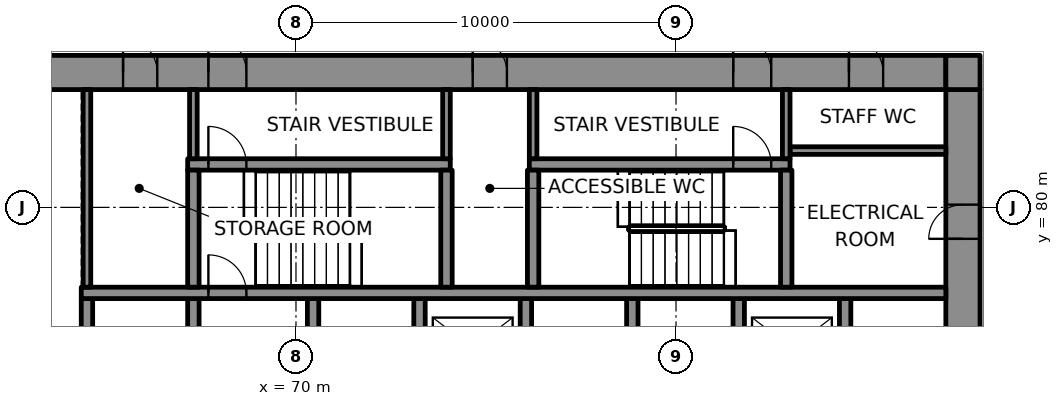
"""IFC4 building model, lengths in metres.
Left out: names, types, materials, properties, quantities, classifications, styles, units other than length and angle.
Written with IfcOpenShell. Run it as: python <this file> out.ifc"""

import sys

from ifc_helpers import new_model, si_unit, direction, frame, frame_2d, origin, place, context, subcontext, project, spatial, rectangle, extrude, element, fill, save


model = new_model("IFC4")
c1 = context("Model", 3, precision=1e-05, world=origin(), true_north=direction((0.0, 1.0)))
c2 = subcontext(c1, "Body", "Model", "MODEL_VIEW")
j1 = project(units=[si_unit("LENGTHUNIT", "METRE"), si_unit("PLANEANGLEUNIT", "RADIAN")], contexts=[c1])
p1 = place(None, origin())
s1 = spatial("IfcSite", under=j1, at=p1, CompositionType="ELEMENT")
p2 = place(p1, origin())
s2 = spatial("IfcBuilding", under=s1, at=p2, CompositionType="ELEMENT")
p3 = place(p2, frame((0.0, 0.0, 140.8)))
s3 = spatial("IfcBuildingStorey", under=s2, at=p3, CompositionType="ELEMENT", Elevation=140.8)
p4 = place(p3, frame((62.0, 83.55, 0.0), z_axis=(0.0, 0.0, 1.0), x_axis=(1.0, 0.0, 0.0)))
e1 = element("IfcWall", 1, at=p4, inside=s3, PredefinedType="SHEAR", context=c2, shape_type="SweptSolid", body=[
    extrude(rectangle(XDim=25.1, YDim=0.9, at=frame_2d((12.55, 0.0))), origin(), (0.0, 0.0, 1.0), 5.55),
])
p5 = place(p4, frame((5.695, 0.0, 0.0)))
e2 = element("IfcOpeningElement", 2, at=p5, cuts=e1, PredefinedType="OPENING", context=c2, shape_type="SweptSolid", body=[
    extrude(rectangle(XDim=1.0, YDim=2.1, at=frame_2d((0.5, 1.05))), frame((0.0, 0.46, 0.0), z_axis=(0.0, -1.0, 0.0), x_axis=(1.0, 0.0, 0.0)), (0.0, 0.0, 1.0), 0.92),
])
p6 = place(p4, frame((19.505, 0.0, 0.0)))
e3 = element("IfcOpeningElement", 3, at=p6, cuts=e1, PredefinedType="OPENING", context=c2, shape_type="SweptSolid", body=[
    extrude(rectangle(XDim=1.0, YDim=2.1, at=frame_2d((0.5, 1.05))), frame((0.0, 0.46, 0.0), z_axis=(0.0, -1.0, 0.0), x_axis=(1.0, 0.0, 0.0)), (0.0, 0.0, 1.0), 0.92),
])
p7 = place(p4, frame((3.45, 0.0, 0.0)))
e4 = element("IfcOpeningElement", 4, at=p7, cuts=e1, PredefinedType="OPENING", context=c2, shape_type="SweptSolid", body=[
    extrude(rectangle(XDim=0.9, YDim=2.1, at=frame_2d((0.45, 1.05))), frame((0.0, 0.46, 0.0), z_axis=(0.0, -1.0, 0.0), x_axis=(1.0, 0.0, 0.0)), (0.0, 0.0, 1.0), 0.92),
])
p8 = place(p4, frame((12.65, 0.0, 0.0)))
e5 = element("IfcOpeningElement", 5, at=p8, cuts=e1, PredefinedType="OPENING", context=c2, shape_type="SweptSolid", body=[
    extrude(rectangle(XDim=0.9, YDim=2.1, at=frame_2d((0.45, 1.05))), frame((0.0, 0.46, 0.0), z_axis=(0.0, -1.0, 0.0), x_axis=(1.0, 0.0, 0.0)), (0.0, 0.0, 1.0), 0.92),
])
p9 = place(p4, frame((22.55, 0.0, 0.0)))
e6 = element("IfcOpeningElement", 6, at=p9, cuts=e1, PredefinedType="OPENING", context=c2, shape_type="SweptSolid", body=[
    extrude(rectangle(XDim=0.9, YDim=2.1, at=frame_2d((0.45, 1.05))), frame((0.0, 0.46, 0.0), z_axis=(0.0, -1.0, 0.0), x_axis=(1.0, 0.0, 0.0)), (0.0, 0.0, 1.0), 0.92),
])
p10 = place(p3, frame((87.55, 66.9, 0.0), z_axis=(0.0, 0.0, 1.0), x_axis=(0.0, 1.0, 0.0)))
e7 = element("IfcWall", 7, at=p10, inside=s3, PredefinedType="SHEAR", context=c2, shape_type="SweptSolid", body=[
    extrude(rectangle(XDim=16.2, YDim=0.9, at=frame_2d((8.1, 0.0))), origin(), (0.0, 0.0, 1.0), 5.55),
])
p11 = place(p10, frame((5.5, 0.0, 0.0)))
e8 = element("IfcOpeningElement", 8, at=p11, cuts=e7, PredefinedType="OPENING", context=c2, shape_type="SweptSolid", body=[
    extrude(rectangle(XDim=1.8, YDim=2.1, at=frame_2d((0.9, 1.05))), frame((0.0, 0.46, 0.0), z_axis=(0.0, -1.0, 0.0), x_axis=(1.0, 0.0, 0.0)), (0.0, 0.0, 1.0), 0.92),
])
p12 = place(p10, frame((12.272, 0.0, 0.0)))
e9 = element("IfcOpeningElement", 9, at=p12, cuts=e7, PredefinedType="OPENING", context=c2, shape_type="SweptSolid", body=[
    extrude(rectangle(XDim=0.9, YDim=2.1, at=frame_2d((0.45, 1.05))), frame((0.0, 0.46, 0.0), z_axis=(0.0, -1.0, 0.0), x_axis=(1.0, 0.0, 0.0)), (0.0, 0.0, 1.0), 0.92),
])
for number, where, z_axis, x_axis in (
    (10, (64.5, 75.0, 0.0), (0.0, 0.0, 1.0), (0.0, 1.0, 0.0)),
    (11, (67.3, 75.0, 0.0), (0.0, 0.0, 1.0), (0.0, 1.0, 0.0)),
):
    element("IfcWall", number, at=place(p3, frame(where, z_axis=z_axis, x_axis=x_axis)), inside=s3, PredefinedType="SHEAR", context=c2, shape_type="SweptSolid", body=[
        extrude(rectangle(XDim=2.6, YDim=0.3, at=frame_2d((1.3, 0.0))), origin(), (0.0, 0.0, 1.0), 5.55),
    ])
p13 = place(p3, frame((70.45, 75.0, 0.0), z_axis=(0.0, 0.0, 1.0), x_axis=(0.0, 1.0, 0.0)))
e12 = element("IfcWall", 12, at=p13, inside=s3, PredefinedType="SHEAR", context=c2, shape_type="SweptSolid", body=[
    extrude(rectangle(XDim=2.6, YDim=0.3, at=frame_2d((1.3, 0.0))), origin(), (0.0, 0.0, 1.0), 5.55),
])
p14 = place(p13, frame((0.15, 0.0, 0.0)))
e13 = element("IfcOpeningElement", 13, at=p14, cuts=e12, PredefinedType="OPENING", context=c2, shape_type="SweptSolid", body=[
    extrude(rectangle(XDim=1.1, YDim=2.1, at=frame_2d((0.55, 1.05))), frame((0.0, 0.16, 0.0), z_axis=(0.0, -1.0, 0.0), x_axis=(1.0, 0.0, 0.0)), (0.0, 0.0, 1.0), 0.32),
])
for number, where, z_axis, x_axis in (
    (14, (73.25, 75.0, 0.0), (0.0, 0.0, 1.0), (0.0, 1.0, 0.0)),
    (15, (76.05, 75.0, 0.0), (0.0, 0.0, 1.0), (0.0, 1.0, 0.0)),
    (16, (78.85, 75.0, 0.0), (0.0, 0.0, 1.0), (0.0, 1.0, 0.0)),
    (17, (81.65, 75.0, 0.0), (0.0, 0.0, 1.0), (0.0, 1.0, 0.0)),
    (18, (84.45, 75.0, 0.0), (0.0, 0.0, 1.0), (0.0, 1.0, 0.0)),
):
    element("IfcWall", number, at=place(p3, frame(where, z_axis=z_axis, x_axis=x_axis)), inside=s3, PredefinedType="SHEAR", context=c2, shape_type="SweptSolid", body=[
        extrude(rectangle(XDim=2.6, YDim=0.3, at=frame_2d((1.3, 0.0))), origin(), (0.0, 0.0, 1.0), 5.55),
    ])
p15 = place(p3, frame((64.35, 77.75, 0.0), z_axis=(0.0, 0.0, 1.0), x_axis=(1.0, 0.0, 0.0)))
e19 = element("IfcWall", 19, at=p15, inside=s3, PredefinedType="SHEAR", context=c2, shape_type="SweptSolid", body=[
    extrude(rectangle(XDim=22.75, YDim=0.3, at=frame_2d((11.375, 0.0))), origin(), (0.0, 0.0, 1.0), 5.55),
])
p16 = place(p15, frame((3.345, 0.0, 0.0)))
e20 = element("IfcOpeningElement", 20, at=p16, cuts=e19, PredefinedType="OPENING", context=c2, shape_type="SweptSolid", body=[
    extrude(rectangle(XDim=1.0, YDim=2.1, at=frame_2d((0.5, 1.05))), frame((0.0, 0.16, 0.0), z_axis=(0.0, -1.0, 0.0), x_axis=(1.0, 0.0, 0.0)), (0.0, 0.0, 1.0), 0.32),
])
p17 = place(p3, frame((67.15, 81.13, 0.0), z_axis=(0.0, 0.0, 1.0), x_axis=(1.0, 0.0, 0.0)))
e21 = element("IfcWall", 21, at=p17, inside=s3, PredefinedType="SHEAR", context=c2, shape_type="SweptSolid", body=[
    extrude(rectangle(XDim=6.91, YDim=0.3, at=frame_2d((3.455, 0.0))), origin(), (0.0, 0.0, 1.0), 5.55),
])
p18 = place(p17, frame((0.545, 0.0, 0.0)))
e22 = element("IfcOpeningElement", 22, at=p18, cuts=e21, PredefinedType="OPENING", context=c2, shape_type="SweptSolid", body=[
    extrude(rectangle(XDim=1.0, YDim=2.1, at=frame_2d((0.5, 1.05))), frame((0.0, 0.16, 0.0), z_axis=(0.0, -1.0, 0.0), x_axis=(1.0, 0.0, 0.0)), (0.0, 0.0, 1.0), 0.32),
])
p19 = place(p3, frame((76.14, 81.13, 0.0), z_axis=(0.0, 0.0, 1.0), x_axis=(1.0, 0.0, 0.0)))
e23 = element("IfcWall", 23, at=p19, inside=s3, PredefinedType="SHEAR", context=c2, shape_type="SweptSolid", body=[
    extrude(rectangle(XDim=6.86, YDim=0.3, at=frame_2d((3.43, 0.0))), origin(), (0.0, 0.0, 1.0), 5.55),
])
p20 = place(p19, frame((5.365, 0.0, 0.0)))
e24 = element("IfcOpeningElement", 24, at=p20, cuts=e23, PredefinedType="OPENING", context=c2, shape_type="SweptSolid", body=[
    extrude(rectangle(XDim=1.0, YDim=2.1, at=frame_2d((0.5, 1.05))), frame((0.0, 0.16, 0.0), z_axis=(0.0, -1.0, 0.0), x_axis=(1.0, 0.0, 0.0)), (0.0, 0.0, 1.0), 0.32),
])
for number, where, z_axis, x_axis in (
    (25, (67.3, 77.9, 0.0), (0.0, 0.0, 1.0), (0.0, 1.0, 0.0)),
    (26, (73.96, 77.9, 0.0), (0.0, 0.0, 1.0), (0.0, 1.0, 0.0)),
    (27, (76.24, 77.9, 0.0), (0.0, 0.0, 1.0), (0.0, 1.0, 0.0)),
    (28, (82.9, 77.9, 0.0), (0.0, 0.0, 1.0), (0.0, 1.0, 0.0)),
):
    element("IfcWall", number, at=place(p3, frame(where, z_axis=z_axis, x_axis=x_axis)), inside=s3, PredefinedType="SHEAR", context=c2, shape_type="SweptSolid", body=[
        extrude(rectangle(XDim=3.08, YDim=0.3, at=frame_2d((1.54, 0.0))), origin(), (0.0, 0.0, 1.0), 5.55),
    ])
p21 = place(p3, frame((87.1, 83.55, 0.0), z_axis=(0.0, 0.0, 1.0), x_axis=(1.0, 0.0, 0.0)))
e29 = element("IfcWall", 29, at=p21, inside=s3, PredefinedType="SHEAR", context=c2, shape_type="SweptSolid", body=[
    extrude(rectangle(XDim=0.9, YDim=0.9, at=frame_2d((0.45, 0.0))), origin(), (0.0, 0.0, 1.0), 5.55),
])
p22 = place(p3, frame((83.0, 81.495, 0.0), z_axis=(0.0, 0.0, 1.0), x_axis=(1.0, 0.0, 0.0)))
e30 = element("IfcWall", 30, at=p22, inside=s3, PredefinedType="PARTITIONING", context=c2, shape_type="SweptSolid", body=[
    extrude(rectangle(XDim=4.1, YDim=0.2, at=frame_2d((2.05, 0.0))), origin(), (0.0, 0.0, 1.0), 5.55),
])
p23 = place(p3, frame((64.5, 77.9, 0.0), z_axis=(0.0, 0.0, 1.0), x_axis=(0.0, 1.0, 0.0)))
e31 = element("IfcWall", 31, at=p23, inside=s3, PredefinedType="PARTITIONING", context=c2, shape_type="SweptSolid", body=[
    extrude(rectangle(XDim=5.2, YDim=0.2, at=frame_2d((2.6, 0.0))), origin(), (0.0, 0.0, 1.0), 5.55),
])
for number, where, z_axis, x_axis in (
    (32, (67.3, 81.28, 0.0), (0.0, 0.0, 1.0), (0.0, 1.0, 0.0)),
    (33, (73.96, 81.28, 0.0), (0.0, 0.0, 1.0), (0.0, 1.0, 0.0)),
    (34, (76.24, 81.28, 0.0), (0.0, 0.0, 1.0), (0.0, 1.0, 0.0)),
    (35, (82.9, 81.28, 0.0), (0.0, 0.0, 1.0), (0.0, 1.0, 0.0)),
):
    element("IfcWall", number, at=place(p3, frame(where, z_axis=z_axis, x_axis=x_axis)), inside=s3, PredefinedType="PARTITIONING", context=c2, shape_type="SweptSolid", body=[
        extrude(rectangle(XDim=1.82, YDim=0.2, at=frame_2d((0.91, 0.0))), origin(), (0.0, 0.0, 1.0), 5.55),
    ])
p24 = place(p16, origin())
e36 = element("IfcDoor", 36, at=p24, inside=s3, OperationType="SINGLE_SWING_LEFT", PredefinedType="DOOR", context=c2, shape_type="SweptSolid", body=[
    extrude(rectangle(XDim=1.0, YDim=2.1, at=frame_2d((0.5, 1.05))), frame((0.0, 0.025, 0.0), z_axis=(0.0, -1.0, 0.0), x_axis=(1.0, 0.0, 0.0)), (0.0, 0.0, 1.0), 0.05),
])
fill(e20, e36)
p25 = place(p18, origin())
e37 = element("IfcDoor", 37, at=p25, inside=s3, OperationType="SINGLE_SWING_RIGHT", PredefinedType="DOOR", context=c2, shape_type="SweptSolid", body=[
    extrude(rectangle(XDim=1.0, YDim=2.1, at=frame_2d((0.5, 1.05))), frame((0.0, 0.025, 0.0), z_axis=(0.0, -1.0, 0.0), x_axis=(1.0, 0.0, 0.0)), (0.0, 0.0, 1.0), 0.05),
])
fill(e22, e37)
p26 = place(p5, origin())
e38 = element("IfcDoor", 38, at=p26, inside=s3, OperationType="SINGLE_SWING_LEFT", PredefinedType="DOOR", context=c2, shape_type="SweptSolid", body=[
    extrude(rectangle(XDim=1.0, YDim=2.1, at=frame_2d((0.5, 1.05))), frame((0.0, 0.17, 0.0), z_axis=(0.0, -1.0, 0.0), x_axis=(1.0, 0.0, 0.0)), (0.0, 0.0, 1.0), 0.34),
])
fill(e2, e38)
p27 = place(p20, origin())
e39 = element("IfcDoor", 39, at=p27, inside=s3, OperationType="SINGLE_SWING_RIGHT", PredefinedType="DOOR", context=c2, shape_type="SweptSolid", body=[
    extrude(rectangle(XDim=1.0, YDim=2.1, at=frame_2d((0.5, 1.05))), frame((0.0, 0.025, 0.0), z_axis=(0.0, -1.0, 0.0), x_axis=(1.0, 0.0, 0.0)), (0.0, 0.0, 1.0), 0.05),
])
fill(e24, e39)
p28 = place(p6, origin())
e40 = element("IfcDoor", 40, at=p28, inside=s3, OperationType="SINGLE_SWING_LEFT", PredefinedType="DOOR", context=c2, shape_type="SweptSolid", body=[
    extrude(rectangle(XDim=1.0, YDim=2.1, at=frame_2d((0.5, 1.05))), frame((0.0, 0.17, 0.0), z_axis=(0.0, -1.0, 0.0), x_axis=(1.0, 0.0, 0.0)), (0.0, 0.0, 1.0), 0.34),
])
fill(e3, e40)
p29 = place(p7, origin())
e41 = element("IfcDoor", 41, at=p29, inside=s3, OperationType="SINGLE_SWING_RIGHT", PredefinedType="DOOR", context=c2, shape_type="SweptSolid", body=[
    extrude(rectangle(XDim=0.9, YDim=2.1, at=frame_2d((0.45, 1.05))), frame((0.0, 0.17, 0.0), z_axis=(0.0, -1.0, 0.0), x_axis=(1.0, 0.0, 0.0)), (0.0, 0.0, 1.0), 0.34),
])
fill(e4, e41)
p30 = place(p8, origin())
e42 = element("IfcDoor", 42, at=p30, inside=s3, OperationType="SINGLE_SWING_LEFT", PredefinedType="DOOR", context=c2, shape_type="SweptSolid", body=[
    extrude(rectangle(XDim=0.9, YDim=2.1, at=frame_2d((0.45, 1.05))), frame((0.0, 0.17, 0.0), z_axis=(0.0, -1.0, 0.0), x_axis=(1.0, 0.0, 0.0)), (0.0, 0.0, 1.0), 0.34),
])
fill(e5, e42)
p31 = place(p12, origin())
e43 = element("IfcDoor", 43, at=p31, inside=s3, OperationType="SINGLE_SWING_RIGHT", PredefinedType="DOOR", context=c2, shape_type="SweptSolid", body=[
    extrude(rectangle(XDim=0.9, YDim=2.1, at=frame_2d((0.45, 1.05))), frame((0.0, 0.17, 0.0), z_axis=(0.0, -1.0, 0.0), x_axis=(1.0, 0.0, 0.0)), (0.0, 0.0, 1.0), 0.34),
])
fill(e9, e43)
p32 = place(p9, origin())
e44 = element("IfcDoor", 44, at=p32, inside=s3, OperationType="SINGLE_SWING_LEFT", PredefinedType="DOOR", context=c2, shape_type="SweptSolid", body=[
    extrude(rectangle(XDim=0.9, YDim=2.1, at=frame_2d((0.45, 1.05))), frame((0.0, 0.17, 0.0), z_axis=(0.0, -1.0, 0.0), x_axis=(1.0, 0.0, 0.0)), (0.0, 0.0, 1.0), 0.34),
])
fill(e6, e44)
save(model, sys.argv[1])
